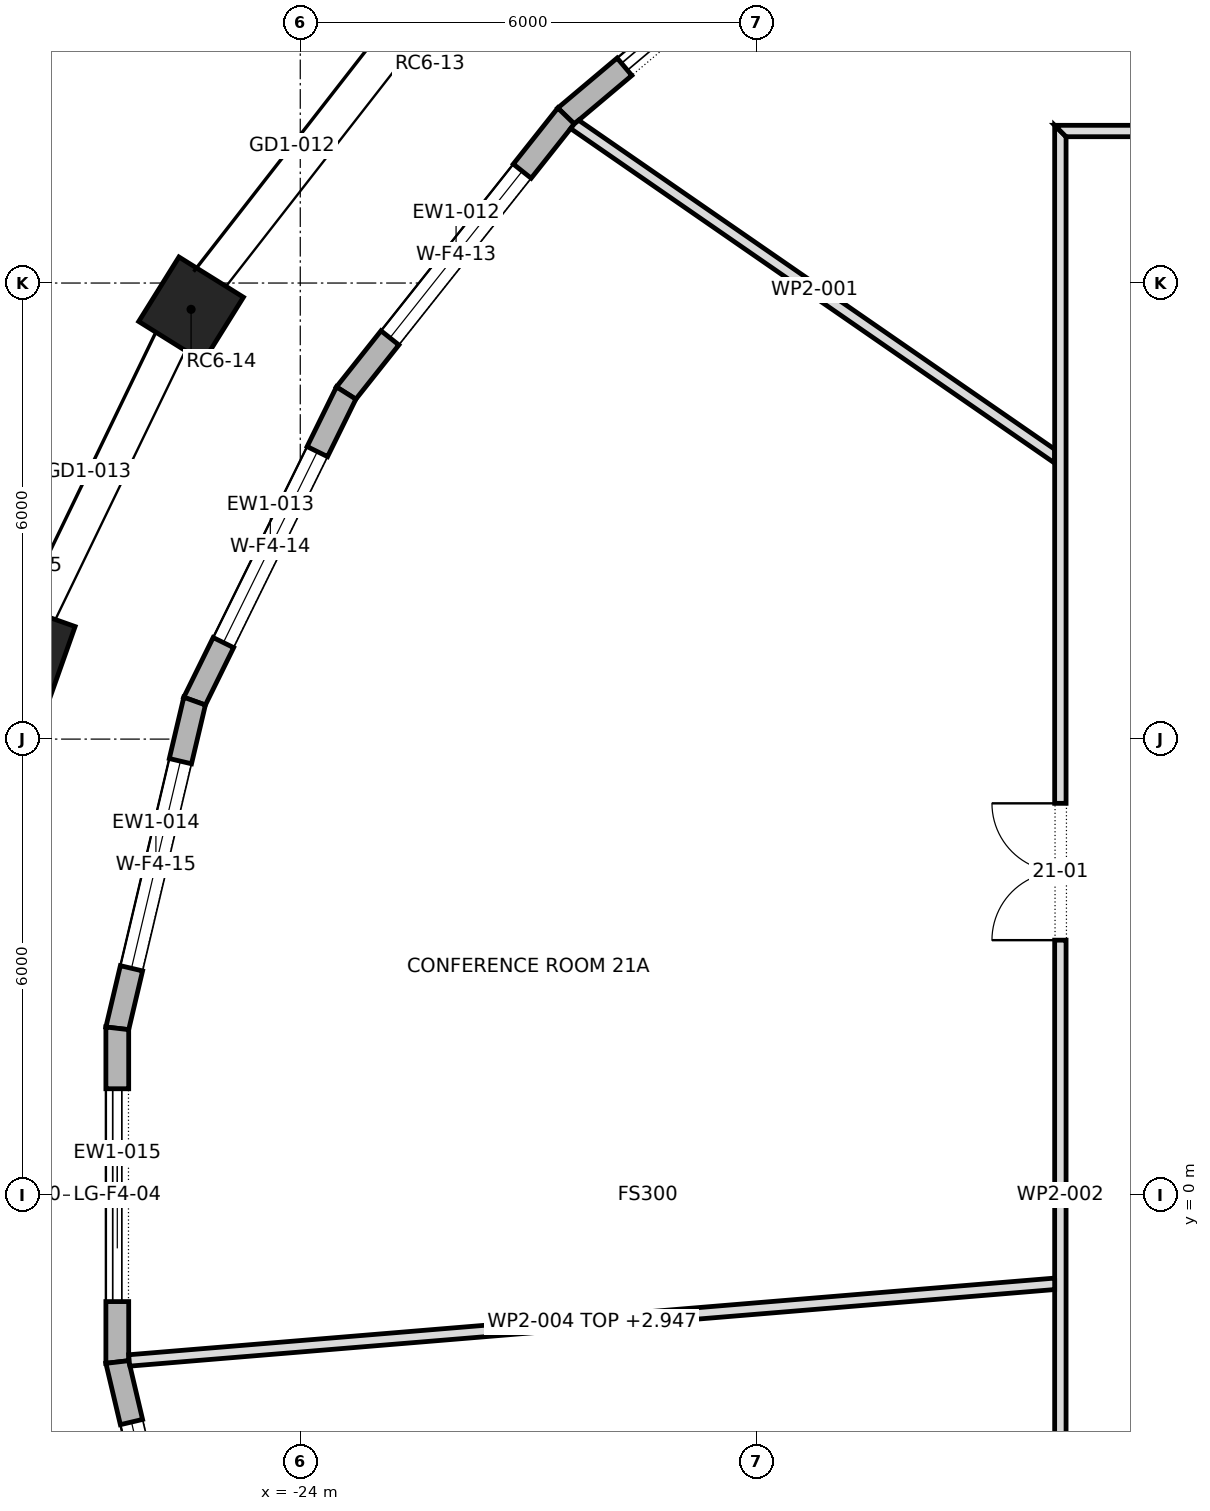
"""IFC4 building model, lengths in metres.
Left out: names, types, materials, properties, quantities, classifications, styles, units other than length and angle.
Written with IfcOpenShell. Run it as: python <this file> out.ifc"""

import sys

from ifc_helpers import new_model, si_unit, direction, frame, frame_2d, origin, origin_2d, place, context, subcontext, project, spatial, polyline, rectangle, outline, extrude, element, fill, save


model = new_model("IFC4")
c1 = context("Model", 3, precision=1e-05, world=origin(), true_north=direction((0.0, 1.0)))
c2 = subcontext(c1, "Body", "Model", "MODEL_VIEW")
j1 = project(units=[si_unit("LENGTHUNIT", "METRE"), si_unit("PLANEANGLEUNIT", "RADIAN")], contexts=[c1])
p1 = place(None, origin())
s1 = spatial("IfcSite", under=j1, at=p1, CompositionType="ELEMENT")
p2 = place(p1, origin())
s2 = spatial("IfcBuilding", under=s1, at=p2, CompositionType="ELEMENT")
p3 = place(p2, frame((0.0, 0.0, 300.3)))
s3 = spatial("IfcBuildingStorey", under=s2, at=p3, CompositionType="ELEMENT", Elevation=300.3)
for number, where, z_axis, x_axis in (
    (1, (-22.295, 15.683, 0.0), (0.0, 0.0, 1.0), (-0.692, -0.722, 0.0)),
    (2, (-25.437, 11.654, 0.0), (0.0, 0.0, 1.0), (-0.529, -0.849, 0.0)),
    (3, (-27.6, 7.177, 0.0), (0.0, 0.0, 1.0), (-0.334, -0.943, 0.0)),
):
    element("IfcColumn", number, at=place(p3, frame(where, z_axis=z_axis, x_axis=x_axis)), inside=s3, PredefinedType="COLUMN", context=c2, shape_type="SweptSolid", body=[
        extrude(rectangle(XDim=1.0, YDim=1.0, at=origin_2d()), origin(), (0.0, 0.0, 1.0), 4.0),
    ])
p4 = place(p3, frame((-16.824, 17.296, 0.0), z_axis=(0.0, 0.0, 1.0), x_axis=(-0.764966473721, -0.644070100286, 0.0)))
e4 = element("IfcWall", 4, at=p4, inside=s3, PredefinedType="STANDARD", context=c2, shape_type="SweptSolid", body=[
    extrude(outline(polyline([(-0.014, -0.15), (4.825, -0.15), (4.795, 0.15), (0.014, 0.15), (-0.014, -0.15)])), origin(), (0.0, 0.0, 1.0), 3.7),
])
p5 = place(p4, frame((1.005, 0.0, 0.0)))
e5 = element("IfcOpeningElement", 5, at=p5, cuts=e4, PredefinedType="OPENING", context=c2, shape_type="SweptSolid", body=[
    extrude(rectangle(XDim=2.8, YDim=3.25, at=frame_2d((1.4, 1.625))), frame((0.0, 0.162, 0.0), z_axis=(0.0, -1.0, 0.0), x_axis=(1.0, 0.0, 0.0)), (0.0, 0.0, 1.0), 0.324),
])
p6 = place(p3, frame((-20.503, 14.198, 0.0), z_axis=(0.0, 0.0, 1.0), x_axis=(-0.621625671247, -0.783314448256, 0.0)))
e6 = element("IfcWall", 6, at=p6, inside=s3, PredefinedType="STANDARD", context=c2, shape_type="SweptSolid", body=[
    extrude(outline(polyline([(-0.015, -0.15), (4.67, -0.15), (4.637, 0.15), (0.015, 0.15), (-0.015, -0.15)])), origin(), (0.0, 0.0, 1.0), 3.7),
])
p7 = place(p6, frame((0.927, 0.0, 0.6)))
e7 = element("IfcOpeningElement", 7, at=p7, cuts=e6, PredefinedType="OPENING", context=c2, shape_type="SweptSolid", body=[
    extrude(rectangle(XDim=2.8, YDim=2.65, at=frame_2d((1.4, 1.325))), frame((0.0, 0.162, 0.0), z_axis=(0.0, -1.0, 0.0), x_axis=(1.0, 0.0, 0.0)), (0.0, 0.0, 1.0), 0.324),
])
p8 = place(p3, frame((-23.396, 10.553, 0.0), z_axis=(0.0, 0.0, 1.0), x_axis=(-0.441431671743, -0.897294867467, 0.0)))
e8 = element("IfcWall", 8, at=p8, inside=s3, PredefinedType="STANDARD", context=c2, shape_type="SweptSolid", body=[
    extrude(outline(polyline([(-0.016, -0.15), (4.534, -0.15), (4.5, 0.15), (0.016, 0.15), (-0.016, -0.15)])), origin(), (0.0, 0.0, 1.0), 3.7),
])
p9 = place(p8, frame((0.858, 0.0, 0.6)))
e9 = element("IfcOpeningElement", 9, at=p9, cuts=e8, PredefinedType="OPENING", context=c2, shape_type="SweptSolid", body=[
    extrude(rectangle(XDim=2.8, YDim=2.65, at=frame_2d((1.4, 1.325))), frame((0.0, 0.162, 0.0), z_axis=(0.0, -1.0, 0.0), x_axis=(1.0, 0.0, 0.0)), (0.0, 0.0, 1.0), 0.324),
])
p10 = place(p3, frame((-25.39, 6.5, 0.0), z_axis=(0.0, 0.0, 1.0), x_axis=(-0.229943714271, -0.973203929435, 0.0)))
e10 = element("IfcWall", 10, at=p10, inside=s3, PredefinedType="STANDARD", context=c2, shape_type="SweptSolid", body=[
    extrude(outline(polyline([(-0.017, -0.15), (4.441, -0.15), (4.406, 0.15), (0.017, 0.15), (-0.017, -0.15)])), origin(), (0.0, 0.0, 1.0), 3.7),
])
p11 = place(p10, frame((0.812, 0.0, 0.6)))
e11 = element("IfcOpeningElement", 11, at=p11, cuts=e10, PredefinedType="OPENING", context=c2, shape_type="SweptSolid", body=[
    extrude(rectangle(XDim=2.8, YDim=2.65, at=frame_2d((1.4, 1.325))), frame((0.0, 0.162, 0.0), z_axis=(0.0, -1.0, 0.0), x_axis=(1.0, 0.0, 0.0)), (0.0, 0.0, 1.0), 0.324),
])
p12 = place(p3, frame((-26.407, 2.195, 0.0), z_axis=(0.0, 0.0, 1.0), x_axis=(0.0, -1.0, 0.0)))
e12 = element("IfcWall", 12, at=p12, inside=s3, PredefinedType="STANDARD", context=c2, shape_type="SweptSolid", body=[
    extrude(outline(polyline([(-0.018, -0.15), (4.408, -0.15), (4.373, 0.15), (0.018, 0.15), (-0.018, -0.15)])), origin(), (0.0, 0.0, 1.0), 3.7),
])
p13 = place(p12, frame((0.795, 0.0, 0.0)))
e13 = element("IfcOpeningElement", 13, at=p13, cuts=e12, PredefinedType="OPENING", context=c2, shape_type="SweptSolid", body=[
    extrude(rectangle(XDim=2.8, YDim=3.25, at=frame_2d((1.4, 1.625))), frame((0.0, 0.162, 0.0), z_axis=(0.0, -1.0, 0.0), x_axis=(1.0, 0.0, 0.0)), (0.0, 0.0, 1.0), 0.324),
])
p14 = place(p3, frame((-26.407, -2.195, 0.0), z_axis=(0.0, 0.0, 1.0), x_axis=(0.229943714271, -0.973203929435, 0.0)))
e14 = element("IfcWall", 14, at=p14, inside=s3, PredefinedType="STANDARD", context=c2, shape_type="SweptSolid", body=[
    extrude(outline(polyline([(-0.018, -0.15), (4.44, -0.15), (4.406, 0.15), (0.018, 0.15), (-0.018, -0.15)])), origin(), (0.0, 0.0, 1.0), 3.7),
])
p15 = place(p14, frame((0.812, 0.0, 0.6)))
e15 = element("IfcOpeningElement", 15, at=p15, cuts=e14, PredefinedType="OPENING", context=c2, shape_type="SweptSolid", body=[
    extrude(rectangle(XDim=2.8, YDim=2.65, at=frame_2d((1.4, 1.325))), frame((0.0, 0.162, 0.0), z_axis=(0.0, -1.0, 0.0), x_axis=(1.0, 0.0, 0.0)), (0.0, 0.0, 1.0), 0.324),
])
p16 = place(p3, frame((-20.4, 14.094, 0.0), z_axis=(0.0, 0.0, 1.0), x_axis=(0.822587107867, -0.568639121035, 0.0)))
e16 = element("IfcWall", 16, at=p16, inside=s3, PredefinedType="PARTITIONING", context=c2, shape_type="SweptSolid", body=[
    extrude(outline(polyline([(7.741, -0.075), (7.741, -0.075), (7.637, 0.075), (5.734, 0.075), (3.831, 0.075), (1.928, 0.075), (0.025, 0.075), (0.005, 0.002), (0.0, -0.07), (0.0, -0.075), (1.935, -0.075), (3.871, -0.075), (5.806, -0.075), (7.741, -0.075)])), origin(), (0.0, 0.0, 1.0), 3.7),
])
p17 = place(p3, frame((-14.0, -14.075, 0.0), z_axis=(0.0, 0.0, 1.0), x_axis=(0.0, 1.0, 0.0)))
e17 = element("IfcWall", 17, at=p17, inside=s3, PredefinedType="PARTITIONING", context=c2, shape_type="SweptSolid", body=[
    extrude(outline(polyline([(0.15, -0.075), (2.139, -0.075), (4.128, -0.075), (6.118, -0.075), (8.107, -0.075), (10.096, -0.075), (12.086, -0.075), (14.075, -0.075), (16.064, -0.075), (18.053, -0.075), (20.043, -0.075), (22.032, -0.075), (24.021, -0.075), (26.011, -0.075), (28.0, -0.075), (28.15, 0.075), (26.273, 0.075), (24.396, 0.075), (22.52, 0.075), (20.643, 0.075), (18.767, 0.075), (16.89, 0.075), (15.013, 0.075), (13.137, 0.075), (11.26, 0.075), (9.383, 0.075), (7.507, 0.075), (5.63, 0.075), (3.753, 0.075), (1.877, 0.075), (0.0, 0.075), (0.15, -0.075)])), origin(), (0.0, 0.0, 1.0), 3.7),
])
p18 = place(p17, frame((17.43, 0.0, 0.0)))
e18 = element("IfcOpeningElement", 18, at=p18, cuts=e17, PredefinedType="OPENING", context=c2, shape_type="SweptSolid", body=[
    extrude(rectangle(XDim=1.8, YDim=2.1, at=frame_2d((0.9, 1.05))), frame((0.0, 0.087, 0.0), z_axis=(0.0, -1.0, 0.0), x_axis=(1.0, 0.0, 0.0)), (0.0, 0.0, 1.0), 0.174),
])
p19 = place(p17, frame((5.995, 0.0, 0.0)))
e19 = element("IfcOpeningElement", 19, at=p19, cuts=e17, PredefinedType="OPENING", context=c2, shape_type="SweptSolid", body=[
    extrude(rectangle(XDim=1.0, YDim=2.1, at=frame_2d((0.5, 1.05))), frame((0.0, 0.087, 0.0), z_axis=(0.0, -1.0, 0.0), x_axis=(1.0, 0.0, 0.0)), (0.0, 0.0, 1.0), 0.174),
])
p20 = place(p3, frame((-14.069, -1.166, 0.0), z_axis=(0.0, 0.0, 1.0), x_axis=(-0.99659010846, -0.082511549014, 0.0)))
e20 = element("IfcWall", 20, at=p20, inside=s3, PredefinedType="PARTITIONING", context=c2, shape_type="SweptSolid", body=[
    extrude(outline(polyline([(12.223, -0.075), (12.223, 0.047), (12.219, 0.075), (10.475, 0.075), (8.731, 0.075), (6.987, 0.075), (5.243, 0.075), (3.5, 0.075), (1.756, 0.075), (0.012, 0.075), (0.0, -0.069), (0.0, -0.075), (1.746, -0.075), (3.492, -0.075), (5.239, -0.075), (6.985, -0.075), (8.731, -0.075), (10.477, -0.075), (12.223, -0.075)])), origin(), (0.0, 0.0, 1.0), 2.947),
])
p21 = place(p3, frame((-14.075, 14.0, 0.0), z_axis=(0.0, 0.0, 1.0), x_axis=(1.0, 0.0, 0.0)))
e21 = element("IfcWall", 21, at=p21, inside=s3, PredefinedType="PARTITIONING", context=c2, shape_type="SweptSolid", body=[
    extrude(outline(polyline([(0.15, -0.075), (2.139, -0.075), (4.128, -0.075), (6.118, -0.075), (8.107, -0.075), (10.096, -0.075), (12.086, -0.075), (14.075, -0.075), (16.064, -0.075), (18.053, -0.075), (20.043, -0.075), (22.032, -0.075), (24.021, -0.075), (26.011, -0.075), (28.0, -0.075), (28.15, 0.075), (26.273, 0.075), (24.396, 0.075), (22.52, 0.075), (20.643, 0.075), (18.767, 0.075), (16.89, 0.075), (15.013, 0.075), (13.137, 0.075), (11.26, 0.075), (9.383, 0.075), (7.507, 0.075), (5.63, 0.075), (3.753, 0.075), (1.877, 0.075), (0.0, 0.075), (0.15, -0.075)])), origin(), (0.0, 0.0, 1.0), 3.7),
])
p22 = place(p21, frame((8.695, 0.0, 0.0)))
e22 = element("IfcOpeningElement", 22, at=p22, cuts=e21, PredefinedType="OPENING", context=c2, shape_type="SweptSolid", body=[
    extrude(rectangle(XDim=1.8, YDim=2.1, at=frame_2d((0.9, 1.05))), frame((0.0, 0.087, 0.0), z_axis=(0.0, -1.0, 0.0), x_axis=(1.0, 0.0, 0.0)), (0.0, 0.0, 1.0), 0.174),
])
p23 = place(p5, origin())
e23 = element("IfcDoor", 23, at=p23, inside=s3, OperationType="DOUBLE_DOOR_SLIDING", PredefinedType="DOOR", context=c2, shape_type="SweptSolid", body=[
    extrude(rectangle(XDim=2.8, YDim=3.25, at=frame_2d((1.4, 1.625))), frame((0.0, 0.025, 0.0), z_axis=(0.0, -1.0, 0.0), x_axis=(1.0, 0.0, 0.0)), (0.0, 0.0, 1.0), 0.05),
])
fill(e5, e23)
p24 = place(p7, origin())
e24 = element("IfcWindow", 24, at=p24, inside=s3, PartitioningType="DOUBLE_PANEL_VERTICAL", PredefinedType="WINDOW", context=c2, shape_type="SweptSolid", body=[
    extrude(rectangle(XDim=2.8, YDim=2.65, at=frame_2d((1.4, 1.325))), frame((0.0, 0.03, 0.0), z_axis=(0.0, -1.0, 0.0), x_axis=(1.0, 0.0, 0.0)), (0.0, 0.0, 1.0), 0.06),
])
fill(e7, e24)
p25 = place(p9, origin())
e25 = element("IfcWindow", 25, at=p25, inside=s3, PartitioningType="DOUBLE_PANEL_VERTICAL", PredefinedType="WINDOW", context=c2, shape_type="SweptSolid", body=[
    extrude(rectangle(XDim=2.8, YDim=2.65, at=frame_2d((1.4, 1.325))), frame((0.0, 0.03, 0.0), z_axis=(0.0, -1.0, 0.0), x_axis=(1.0, 0.0, 0.0)), (0.0, 0.0, 1.0), 0.06),
])
fill(e9, e25)
p26 = place(p11, origin())
e26 = element("IfcWindow", 26, at=p26, inside=s3, PartitioningType="DOUBLE_PANEL_VERTICAL", PredefinedType="WINDOW", context=c2, shape_type="SweptSolid", body=[
    extrude(rectangle(XDim=2.8, YDim=2.65, at=frame_2d((1.4, 1.325))), frame((0.0, 0.03, 0.0), z_axis=(0.0, -1.0, 0.0), x_axis=(1.0, 0.0, 0.0)), (0.0, 0.0, 1.0), 0.06),
])
fill(e11, e26)
p27 = place(p13, origin())
e27 = element("IfcDoor", 27, at=p27, inside=s3, OperationType="DOUBLE_DOOR_SLIDING", PredefinedType="DOOR", context=c2, shape_type="SweptSolid", body=[
    extrude(rectangle(XDim=2.8, YDim=3.25, at=frame_2d((1.4, 1.625))), frame((0.0, 0.025, 0.0), z_axis=(0.0, -1.0, 0.0), x_axis=(1.0, 0.0, 0.0)), (0.0, 0.0, 1.0), 0.05),
])
fill(e13, e27)
p28 = place(p15, origin())
e28 = element("IfcWindow", 28, at=p28, inside=s3, PartitioningType="DOUBLE_PANEL_VERTICAL", PredefinedType="WINDOW", context=c2, shape_type="SweptSolid", body=[
    extrude(rectangle(XDim=2.8, YDim=2.65, at=frame_2d((1.4, 1.325))), frame((0.0, 0.03, 0.0), z_axis=(0.0, -1.0, 0.0), x_axis=(1.0, 0.0, 0.0)), (0.0, 0.0, 1.0), 0.06),
])
fill(e15, e28)
p29 = place(p18, origin())
e29 = element("IfcDoor", 29, at=p29, inside=s3, OperationType="DOUBLE_DOOR_SINGLE_SWING", PredefinedType="DOOR", context=c2, shape_type="SweptSolid", body=[
    extrude(rectangle(XDim=1.8, YDim=2.1, at=frame_2d((0.9, 1.05))), frame((0.0, 0.025, 0.0), z_axis=(0.0, -1.0, 0.0), x_axis=(1.0, 0.0, 0.0)), (0.0, 0.0, 1.0), 0.05),
])
fill(e18, e29)
save(model, sys.argv[1])
